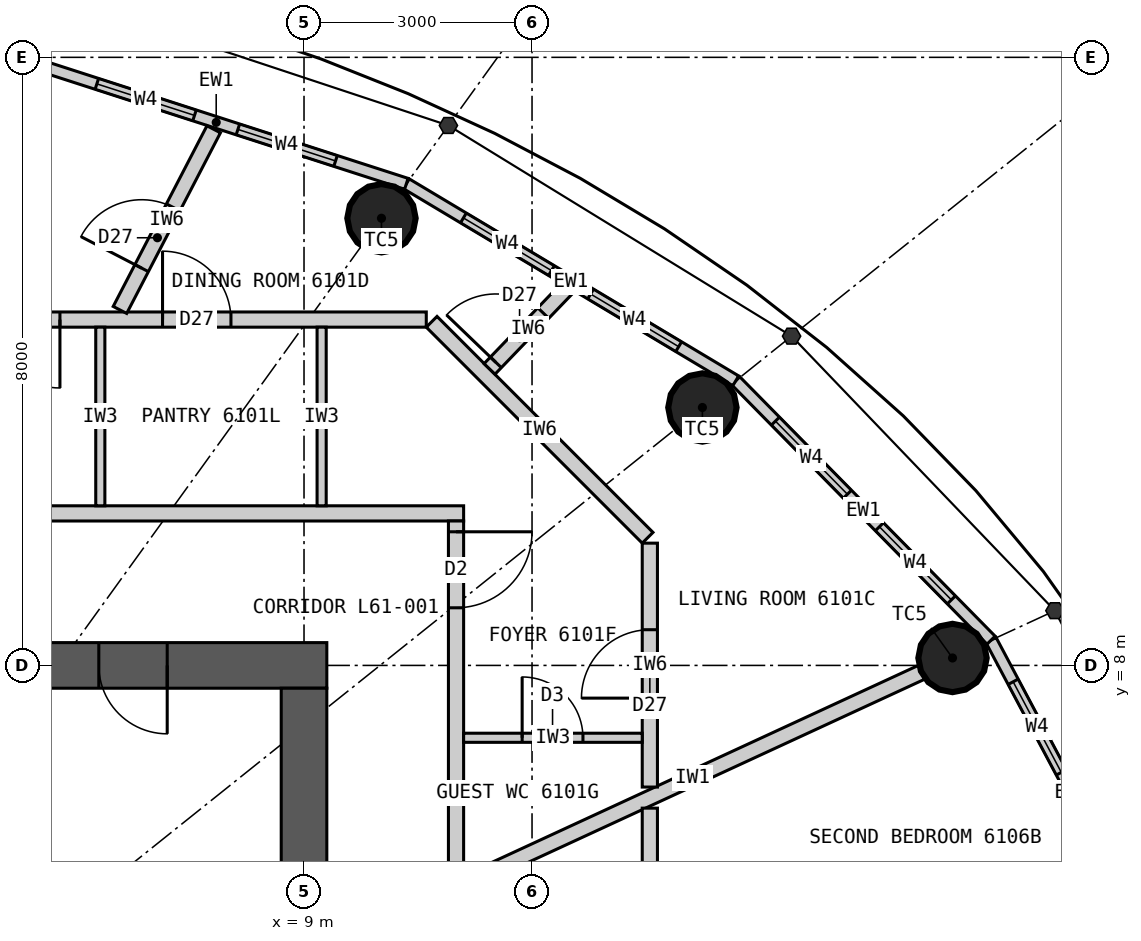
"""IFC4 building model, lengths in metres.
Left out: names, types, materials, properties, quantities, classifications, styles, units other than length and angle.
Written with IfcOpenShell. Run it as: python <this file> out.ifc"""

import sys

from ifc_helpers import new_model, si_unit, direction, frame, frame_2d, origin, origin_2d, place, context, subcontext, project, spatial, rectangle, circle, extrude, element, fill, save


model = new_model("IFC4")
c1 = context("Model", 3, precision=1e-05, world=origin(), true_north=direction((0.0, 1.0)))
c2 = subcontext(c1, "Body", "Model", "MODEL_VIEW")
j1 = project(units=[si_unit("LENGTHUNIT", "METRE"), si_unit("PLANEANGLEUNIT", "RADIAN")], contexts=[c1])
p1 = place(None, origin())
s1 = spatial("IfcSite", under=j1, at=p1, CompositionType="ELEMENT")
p2 = place(p1, origin())
s2 = spatial("IfcBuilding", under=s1, at=p2, CompositionType="ELEMENT")
p3 = place(p2, frame((0.0, 0.0, 225.9)))
s3 = spatial("IfcBuildingStorey", under=s2, at=p3, CompositionType="ELEMENT", Elevation=225.9)
for number, where, z_axis, x_axis in (
    (1, (17.532, 8.098, 0.0), (0.0, 0.0, 1.0), (1.0, 0.0, 0.0)),
    (2, (14.241, 11.393, 0.0), (0.0, 0.0, 1.0), (1.0, 0.0, 0.0)),
    (3, (10.019, 13.883, 0.0), (0.0, 0.0, 1.0), (1.0, 0.0, 0.0)),
):
    element("IfcColumn", number, at=place(p3, frame(where, z_axis=z_axis, x_axis=x_axis)), inside=s3, PredefinedType="COLUMN", context=c2, shape_type="SweptSolid", body=[
        extrude(circle(Radius=0.45, at=origin_2d()), origin(), (0.0, 0.0, 1.0), 3.3),
    ])
p4 = place(p3, frame((-9.3, 8.0, 0.0), z_axis=(0.0, 0.0, 1.0), x_axis=(1.0, 0.0, 0.0)))
e4 = element("IfcWall", 4, at=p4, inside=s3, PredefinedType="SHEAR", context=c2, shape_type="SweptSolid", body=[
    extrude(rectangle(XDim=18.6, YDim=0.6, at=frame_2d((9.3, 0.0))), origin(), (0.0, 0.0, 1.0), 3.3),
])
p5 = place(p4, frame((8.0, 0.0, 0.0)))
e5 = element("IfcOpeningElement", 5, at=p5, cuts=e4, PredefinedType="OPENING", context=c2, shape_type="SweptSolid", body=[
    extrude(rectangle(XDim=1.2, YDim=2.2, at=frame_2d((0.6, 1.1))), frame((0.0, 0.31, 0.0), z_axis=(0.0, -1.0, 0.0), x_axis=(1.0, 0.0, 0.0)), (0.0, 0.0, 1.0), 0.62),
])
p6 = place(p4, frame((15.6, 0.0, 0.0)))
e6 = element("IfcOpeningElement", 6, at=p6, cuts=e4, PredefinedType="OPENING", context=c2, shape_type="SweptSolid", body=[
    extrude(rectangle(XDim=0.9, YDim=2.2, at=frame_2d((0.45, 1.1))), frame((0.0, 0.31, 0.0), z_axis=(0.0, -1.0, 0.0), x_axis=(1.0, 0.0, 0.0)), (0.0, 0.0, 1.0), 0.62),
])
p7 = place(p3, frame((9.0, -7.7, 0.0), z_axis=(0.0, 0.0, 1.0), x_axis=(0.0, 1.0, 0.0)))
e7 = element("IfcWall", 7, at=p7, inside=s3, PredefinedType="SHEAR", context=c2, shape_type="SweptSolid", body=[
    extrude(rectangle(XDim=15.4, YDim=0.6, at=frame_2d((7.7, 0.0))), origin(), (0.0, 0.0, 1.0), 3.3),
])
p8 = place(p7, frame((6.8, 0.0, 0.0)))
e8 = element("IfcOpeningElement", 8, at=p8, cuts=e7, PredefinedType="OPENING", context=c2, shape_type="SweptSolid", body=[
    extrude(rectangle(XDim=1.8, YDim=2.2, at=frame_2d((0.9, 1.1))), frame((0.0, 0.31, 0.0), z_axis=(0.0, -1.0, 0.0), x_axis=(1.0, 0.0, 0.0)), (0.0, 0.0, 1.0), 0.62),
])
p9 = place(p3, frame((20.17, 4.323, 0.0), z_axis=(0.0, 0.0, 1.0), x_axis=(-0.469256152955, 0.883062094597, 0.0)))
e9 = element("IfcWall", 9, at=p9, inside=s3, PredefinedType="ELEMENTEDWALL", context=c2, shape_type="SweptSolid", body=[
    extrude(rectangle(XDim=4.539, YDim=0.15, at=frame_2d((2.27, 0.0))), origin(), (0.0, 0.0, 1.0), 3.12),
])
p10 = place(p9, frame((0.62, 0.0, 0.9)))
e10 = element("IfcOpeningElement", 10, at=p10, cuts=e9, PredefinedType="OPENING", context=c2, shape_type="SweptSolid", body=[
    extrude(rectangle(XDim=1.35, YDim=1.9, at=frame_2d((0.675, 0.95))), frame((0.0, 0.085, 0.0), z_axis=(0.0, -1.0, 0.0), x_axis=(1.0, 0.0, 0.0)), (0.0, 0.0, 1.0), 0.17),
])
p11 = place(p9, frame((2.57, 0.0, 0.9)))
e11 = element("IfcOpeningElement", 11, at=p11, cuts=e9, PredefinedType="OPENING", context=c2, shape_type="SweptSolid", body=[
    extrude(rectangle(XDim=1.35, YDim=1.9, at=frame_2d((0.675, 0.95))), frame((0.0, 0.085, 0.0), z_axis=(0.0, -1.0, 0.0), x_axis=(1.0, 0.0, 0.0)), (0.0, 0.0, 1.0), 0.17),
])
p12 = place(p3, frame((18.04, 8.332, 0.0), z_axis=(0.0, 0.0, 1.0), x_axis=(-0.701527379618, 0.712642501993, 0.0)))
e12 = element("IfcWall", 12, at=p12, inside=s3, PredefinedType="ELEMENTEDWALL", context=c2, shape_type="SweptSolid", body=[
    extrude(rectangle(XDim=4.788, YDim=0.15, at=frame_2d((2.394, 0.0))), origin(), (0.0, 0.0, 1.0), 3.12),
])
p13 = place(p12, frame((0.744, 0.0, 0.9)))
e13 = element("IfcOpeningElement", 13, at=p13, cuts=e12, PredefinedType="OPENING", context=c2, shape_type="SweptSolid", body=[
    extrude(rectangle(XDim=1.35, YDim=1.9, at=frame_2d((0.675, 0.95))), frame((0.0, 0.085, 0.0), z_axis=(0.0, -1.0, 0.0), x_axis=(1.0, 0.0, 0.0)), (0.0, 0.0, 1.0), 0.17),
])
p14 = place(p12, frame((2.694, 0.0, 0.9)))
e14 = element("IfcOpeningElement", 14, at=p14, cuts=e12, PredefinedType="OPENING", context=c2, shape_type="SweptSolid", body=[
    extrude(rectangle(XDim=1.35, YDim=1.9, at=frame_2d((0.675, 0.95))), frame((0.0, 0.085, 0.0), z_axis=(0.0, -1.0, 0.0), x_axis=(1.0, 0.0, 0.0)), (0.0, 0.0, 1.0), 0.17),
])
p15 = place(p3, frame((14.68, 11.744, 0.0), z_axis=(0.0, 0.0, 1.0), x_axis=(-0.85822150553, 0.513279502265, 0.0)))
e15 = element("IfcWall", 15, at=p15, inside=s3, PredefinedType="ELEMENTEDWALL", context=c2, shape_type="SweptSolid", body=[
    extrude(rectangle(XDim=5.05, YDim=0.15, at=frame_2d((2.525, 0.0))), origin(), (0.0, 0.0, 1.0), 3.12),
])
p16 = place(p15, frame((0.875, 0.0, 0.9)))
e16 = element("IfcOpeningElement", 16, at=p16, cuts=e15, PredefinedType="OPENING", context=c2, shape_type="SweptSolid", body=[
    extrude(rectangle(XDim=1.35, YDim=1.9, at=frame_2d((0.675, 0.95))), frame((0.0, 0.085, 0.0), z_axis=(0.0, -1.0, 0.0), x_axis=(1.0, 0.0, 0.0)), (0.0, 0.0, 1.0), 0.17),
])
p17 = place(p15, frame((2.825, 0.0, 0.9)))
e17 = element("IfcOpeningElement", 17, at=p17, cuts=e15, PredefinedType="OPENING", context=c2, shape_type="SweptSolid", body=[
    extrude(rectangle(XDim=1.35, YDim=1.9, at=frame_2d((0.675, 0.95))), frame((0.0, 0.085, 0.0), z_axis=(0.0, -1.0, 0.0), x_axis=(1.0, 0.0, 0.0)), (0.0, 0.0, 1.0), 0.17),
])
p18 = place(p3, frame((10.346, 14.336, 0.0), z_axis=(0.0, 0.0, 1.0), x_axis=(-0.951644702515, 0.307200846638, 0.0)))
e18 = element("IfcWall", 18, at=p18, inside=s3, PredefinedType="ELEMENTEDWALL", context=c2, shape_type="SweptSolid", body=[
    extrude(rectangle(XDim=5.258, YDim=0.15, at=frame_2d((2.629, 0.0))), origin(), (0.0, 0.0, 1.0), 3.12),
])
p19 = place(p18, frame((0.979, 0.0, 0.9)))
e19 = element("IfcOpeningElement", 19, at=p19, cuts=e18, PredefinedType="OPENING", context=c2, shape_type="SweptSolid", body=[
    extrude(rectangle(XDim=1.35, YDim=1.9, at=frame_2d((0.675, 0.95))), frame((0.0, 0.085, 0.0), z_axis=(0.0, -1.0, 0.0), x_axis=(1.0, 0.0, 0.0)), (0.0, 0.0, 1.0), 0.17),
])
p20 = place(p18, frame((2.929, 0.0, 0.9)))
e20 = element("IfcOpeningElement", 20, at=p20, cuts=e18, PredefinedType="OPENING", context=c2, shape_type="SweptSolid", body=[
    extrude(rectangle(XDim=1.35, YDim=1.9, at=frame_2d((0.675, 0.95))), frame((0.0, 0.085, 0.0), z_axis=(0.0, -1.0, 0.0), x_axis=(1.0, 0.0, 0.0)), (0.0, 0.0, 1.0), 0.17),
])
p21 = place(p3, frame((-11.1, 10.0, 0.0), z_axis=(0.0, 0.0, 1.0), x_axis=(1.0, 0.0, 0.0)))
e21 = element("IfcWall", 21, at=p21, inside=s3, PredefinedType="PARTITIONING", context=c2, shape_type="SweptSolid", body=[
    extrude(rectangle(XDim=22.2, YDim=0.2, at=frame_2d((11.1, 0.0))), origin(), (0.0, 0.0, 1.0), 3.12),
])
p22 = place(p21, frame((0.3, 0.0, 0.0)))
e22 = element("IfcOpeningElement", 22, at=p22, cuts=e21, PredefinedType="OPENING", context=c2, shape_type="SweptSolid", body=[
    extrude(rectangle(XDim=1.0, YDim=2.2, at=frame_2d((0.5, 1.1))), frame((0.0, 0.11, 0.0), z_axis=(0.0, -1.0, 0.0), x_axis=(1.0, 0.0, 0.0)), (0.0, 0.0, 1.0), 0.22),
])
p23 = place(p3, frame((11.0, -9.9, 0.0), z_axis=(0.0, 0.0, 1.0), x_axis=(0.0, 1.0, 0.0)))
e23 = element("IfcWall", 23, at=p23, inside=s3, PredefinedType="PARTITIONING", context=c2, shape_type="SweptSolid", body=[
    extrude(rectangle(XDim=19.8, YDim=0.2, at=frame_2d((9.9, 0.0))), origin(), (0.0, 0.0, 1.0), 3.12),
])
p24 = place(p23, frame((18.658, 0.0, 0.0)))
e24 = element("IfcOpeningElement", 24, at=p24, cuts=e23, PredefinedType="OPENING", context=c2, shape_type="SweptSolid", body=[
    extrude(rectangle(XDim=1.0, YDim=2.2, at=frame_2d((0.5, 1.1))), frame((0.0, 0.11, 0.0), z_axis=(0.0, -1.0, 0.0), x_axis=(1.0, 0.0, 0.0)), (0.0, 0.0, 1.0), 0.22),
])
p25 = place(p23, frame((9.385, 0.0, 0.0)))
e25 = element("IfcOpeningElement", 25, at=p25, cuts=e23, PredefinedType="OPENING", context=c2, shape_type="SweptSolid", body=[
    extrude(rectangle(XDim=1.0, YDim=2.2, at=frame_2d((0.5, 1.1))), frame((0.0, 0.11, 0.0), z_axis=(0.0, -1.0, 0.0), x_axis=(1.0, 0.0, 0.0)), (0.0, 0.0, 1.0), 0.22),
])
p26 = place(p3, frame((11.1, 5.127, 0.0), z_axis=(0.0, 0.0, 1.0), x_axis=(0.907840886552, 0.419314827672, 0.0)))
e26 = element("IfcWall", 26, at=p26, inside=s3, PredefinedType="PARTITIONING", context=c2, shape_type="SweptSolid", body=[
    extrude(rectangle(XDim=6.635, YDim=0.2, at=frame_2d((3.318, 0.0))), origin(), (0.0, 0.0, 1.0), 2.32),
])
p27 = place(p3, frame((13.55, 6.4, 0.0), z_axis=(0.0, 0.0, 1.0), x_axis=(0.0, 1.0, 0.0)))
e27 = element("IfcWall", 27, at=p27, inside=s3, PredefinedType="PARTITIONING", context=c2, shape_type="SweptSolid", body=[
    extrude(rectangle(XDim=3.209, YDim=0.2, at=frame_2d((1.604, 0.0))), origin(), (0.0, 0.0, 1.0), 3.12),
])
p28 = place(p27, frame((1.17, 0.0, 0.0)))
e28 = element("IfcOpeningElement", 28, at=p28, cuts=e27, PredefinedType="OPENING", context=c2, shape_type="SweptSolid", body=[
    extrude(rectangle(XDim=0.9, YDim=2.1, at=frame_2d((0.45, 1.05))), frame((0.0, 0.11, 0.0), z_axis=(0.0, -1.0, 0.0), x_axis=(1.0, 0.0, 0.0)), (0.0, 0.0, 1.0), 0.22),
])
p29 = place(p3, frame((13.521, 9.679, 0.0), z_axis=(0.0, 0.0, 1.0), x_axis=(-0.707106781187, 0.707106781187, 0.0)))
e29 = element("IfcWall", 29, at=p29, inside=s3, PredefinedType="PARTITIONING", context=c2, shape_type="SweptSolid", body=[
    extrude(rectangle(XDim=4.019, YDim=0.2, at=frame_2d((2.009, 0.0))), origin(), (0.0, 0.0, 1.0), 3.12),
])
p30 = place(p3, frame((10.609, 12.55, 0.0), z_axis=(0.0, 0.0, 1.0), x_axis=(-1.0, 0.0, 0.0)))
e30 = element("IfcWall", 30, at=p30, inside=s3, PredefinedType="PARTITIONING", context=c2, shape_type="SweptSolid", body=[
    extrude(rectangle(XDim=10.508, YDim=0.2, at=frame_2d((5.254, 0.0))), origin(), (0.0, 0.0, 1.0), 3.12),
])
p31 = place(p30, frame((2.57, 0.0, 0.0)))
e31 = element("IfcOpeningElement", 31, at=p31, cuts=e30, PredefinedType="OPENING", context=c2, shape_type="SweptSolid", body=[
    extrude(rectangle(XDim=0.9, YDim=2.1, at=frame_2d((0.45, 1.05))), frame((0.0, 0.11, 0.0), z_axis=(0.0, -1.0, 0.0), x_axis=(1.0, 0.0, 0.0)), (0.0, 0.0, 1.0), 0.22),
])
p32 = place(p30, frame((4.82, 0.0, 0.0)))
e32 = element("IfcOpeningElement", 32, at=p32, cuts=e30, PredefinedType="OPENING", context=c2, shape_type="SweptSolid", body=[
    extrude(rectangle(XDim=0.9, YDim=2.1, at=frame_2d((0.45, 1.05))), frame((0.0, 0.11, 0.0), z_axis=(0.0, -1.0, 0.0), x_axis=(1.0, 0.0, 0.0)), (0.0, 0.0, 1.0), 0.22),
])
p33 = place(p30, frame((7.303, 0.0, 0.0)))
e33 = element("IfcOpeningElement", 33, at=p33, cuts=e30, PredefinedType="OPENING", context=c2, shape_type="SweptSolid", body=[
    extrude(rectangle(XDim=0.8, YDim=2.1, at=frame_2d((0.4, 1.05))), frame((0.0, 0.11, 0.0), z_axis=(0.0, -1.0, 0.0), x_axis=(1.0, 0.0, 0.0)), (0.0, 0.0, 1.0), 0.22),
])
p34 = place(p3, frame((11.441, 11.9, 0.0), z_axis=(0.0, 0.0, 1.0), x_axis=(0.692958717259, 0.720977264672, 0.0)))
e34 = element("IfcWall", 34, at=p34, inside=s3, PredefinedType="PARTITIONING", context=c2, shape_type="SweptSolid", body=[
    extrude(rectangle(XDim=1.464, YDim=0.2, at=frame_2d((0.732, 0.0))), origin(), (0.0, 0.0, 1.0), 3.12),
])
p35 = place(p34, frame((0.12, 0.0, 0.0)))
e35 = element("IfcOpeningElement", 35, at=p35, cuts=e34, PredefinedType="OPENING", context=c2, shape_type="SweptSolid", body=[
    extrude(rectangle(XDim=0.9, YDim=2.1, at=frame_2d((0.45, 1.05))), frame((0.0, 0.11, 0.0), z_axis=(0.0, -1.0, 0.0), x_axis=(1.0, 0.0, 0.0)), (0.0, 0.0, 1.0), 0.22),
])
p36 = place(p3, frame((6.578, 12.677, 0.0), z_axis=(0.0, 0.0, 1.0), x_axis=(0.460620531465, 0.887597164255, 0.0)))
e36 = element("IfcWall", 36, at=p36, inside=s3, PredefinedType="PARTITIONING", context=c2, shape_type="SweptSolid", body=[
    extrude(rectangle(XDim=2.678, YDim=0.2, at=frame_2d((1.339, 0.0))), origin(), (0.0, 0.0, 1.0), 3.12),
])
p37 = place(p36, frame((0.62, 0.0, 0.0)))
e37 = element("IfcOpeningElement", 37, at=p37, cuts=e36, PredefinedType="OPENING", context=c2, shape_type="SweptSolid", body=[
    extrude(rectangle(XDim=0.9, YDim=2.1, at=frame_2d((0.45, 1.05))), frame((0.0, 0.11, 0.0), z_axis=(0.0, -1.0, 0.0), x_axis=(1.0, 0.0, 0.0)), (0.0, 0.0, 1.0), 0.22),
])
p38 = place(p3, frame((11.1, 7.048, 0.0), z_axis=(0.0, 0.0, 1.0), x_axis=(1.0, 0.0, 0.0)))
e38 = element("IfcWall", 38, at=p38, inside=s3, PredefinedType="PARTITIONING", context=c2, shape_type="SweptSolid", body=[
    extrude(rectangle(XDim=2.35, YDim=0.12, at=frame_2d((1.175, 0.0))), origin(), (0.0, 0.0, 1.0), 3.12),
])
p39 = place(p38, frame((0.77, 0.0, 0.0)))
e39 = element("IfcOpeningElement", 39, at=p39, cuts=e38, PredefinedType="OPENING", context=c2, shape_type="SweptSolid", body=[
    extrude(rectangle(XDim=0.8, YDim=2.1, at=frame_2d((0.4, 1.05))), frame((0.0, 0.07, 0.0), z_axis=(0.0, -1.0, 0.0), x_axis=(1.0, 0.0, 0.0)), (0.0, 0.0, 1.0), 0.14),
])
for number, where, z_axis, x_axis in (
    (40, (9.232, 10.1, 0.0), (0.0, 0.0, 1.0), (0.0, 1.0, 0.0)),
    (41, (6.32, 10.1, 0.0), (0.0, 0.0, 1.0), (0.0, 1.0, 0.0)),
):
    element("IfcWall", number, at=place(p3, frame(where, z_axis=z_axis, x_axis=x_axis)), inside=s3, PredefinedType="PARTITIONING", context=c2, shape_type="SweptSolid", body=[
        extrude(rectangle(XDim=2.35, YDim=0.12, at=frame_2d((1.175, 0.0))), origin(), (0.0, 0.0, 1.0), 3.12),
    ])
p40 = place(p3, frame((13.55, -6.122, 0.0), z_axis=(0.0, 0.0, 1.0), x_axis=(0.0, 1.0, 0.0)))
e42 = element("IfcWall", 42, at=p40, inside=s3, PredefinedType="PARTITIONING", context=c2, shape_type="SweptSolid", body=[
    extrude(rectangle(XDim=12.245, YDim=0.2, at=frame_2d((6.122, 0.0))), origin(), (0.0, 0.0, 1.0), 3.12),
])
p41 = place(p40, frame((2.07, 0.0, 0.0)))
e43 = element("IfcOpeningElement", 43, at=p41, cuts=e42, PredefinedType="OPENING", context=c2, shape_type="SweptSolid", body=[
    extrude(rectangle(XDim=0.8, YDim=2.1, at=frame_2d((0.4, 1.05))), frame((0.0, 0.11, 0.0), z_axis=(0.0, -1.0, 0.0), x_axis=(1.0, 0.0, 0.0)), (0.0, 0.0, 1.0), 0.22),
])
p42 = place(p40, frame((9.37, 0.0, 0.0)))
e44 = element("IfcOpeningElement", 44, at=p42, cuts=e42, PredefinedType="OPENING", context=c2, shape_type="SweptSolid", body=[
    extrude(rectangle(XDim=0.8, YDim=2.1, at=frame_2d((0.4, 1.05))), frame((0.0, 0.11, 0.0), z_axis=(0.0, -1.0, 0.0), x_axis=(1.0, 0.0, 0.0)), (0.0, 0.0, 1.0), 0.22),
])
p43 = place(p40, frame((5.67, 0.0, 0.0)))
e45 = element("IfcOpeningElement", 45, at=p43, cuts=e42, PredefinedType="OPENING", context=c2, shape_type="SweptSolid", body=[
    extrude(rectangle(XDim=0.9, YDim=2.1, at=frame_2d((0.45, 1.05))), frame((0.0, 0.11, 0.0), z_axis=(0.0, -1.0, 0.0), x_axis=(1.0, 0.0, 0.0)), (0.0, 0.0, 1.0), 0.22),
])
p44 = place(p11, origin())
e46 = element("IfcWindow", 46, at=p44, inside=s3, PartitioningType="SINGLE_PANEL", PredefinedType="WINDOW", context=c2, shape_type="SweptSolid", body=[
    extrude(rectangle(XDim=1.35, YDim=1.9, at=frame_2d((0.675, 0.95))), frame((0.0, 0.03, 0.0), z_axis=(0.0, -1.0, 0.0), x_axis=(1.0, 0.0, 0.0)), (0.0, 0.0, 1.0), 0.06),
])
fill(e11, e46)
p45 = place(p13, origin())
e47 = element("IfcWindow", 47, at=p45, inside=s3, PartitioningType="SINGLE_PANEL", PredefinedType="WINDOW", context=c2, shape_type="SweptSolid", body=[
    extrude(rectangle(XDim=1.35, YDim=1.9, at=frame_2d((0.675, 0.95))), frame((0.0, 0.03, 0.0), z_axis=(0.0, -1.0, 0.0), x_axis=(1.0, 0.0, 0.0)), (0.0, 0.0, 1.0), 0.06),
])
fill(e13, e47)
p46 = place(p14, origin())
e48 = element("IfcWindow", 48, at=p46, inside=s3, PartitioningType="SINGLE_PANEL", PredefinedType="WINDOW", context=c2, shape_type="SweptSolid", body=[
    extrude(rectangle(XDim=1.35, YDim=1.9, at=frame_2d((0.675, 0.95))), frame((0.0, 0.03, 0.0), z_axis=(0.0, -1.0, 0.0), x_axis=(1.0, 0.0, 0.0)), (0.0, 0.0, 1.0), 0.06),
])
fill(e14, e48)
p47 = place(p16, origin())
e49 = element("IfcWindow", 49, at=p47, inside=s3, PartitioningType="SINGLE_PANEL", PredefinedType="WINDOW", context=c2, shape_type="SweptSolid", body=[
    extrude(rectangle(XDim=1.35, YDim=1.9, at=frame_2d((0.675, 0.95))), frame((0.0, 0.03, 0.0), z_axis=(0.0, -1.0, 0.0), x_axis=(1.0, 0.0, 0.0)), (0.0, 0.0, 1.0), 0.06),
])
fill(e16, e49)
p48 = place(p17, origin())
e50 = element("IfcWindow", 50, at=p48, inside=s3, PartitioningType="SINGLE_PANEL", PredefinedType="WINDOW", context=c2, shape_type="SweptSolid", body=[
    extrude(rectangle(XDim=1.35, YDim=1.9, at=frame_2d((0.675, 0.95))), frame((0.0, 0.03, 0.0), z_axis=(0.0, -1.0, 0.0), x_axis=(1.0, 0.0, 0.0)), (0.0, 0.0, 1.0), 0.06),
])
fill(e17, e50)
p49 = place(p19, origin())
e51 = element("IfcWindow", 51, at=p49, inside=s3, PartitioningType="SINGLE_PANEL", PredefinedType="WINDOW", context=c2, shape_type="SweptSolid", body=[
    extrude(rectangle(XDim=1.35, YDim=1.9, at=frame_2d((0.675, 0.95))), frame((0.0, 0.03, 0.0), z_axis=(0.0, -1.0, 0.0), x_axis=(1.0, 0.0, 0.0)), (0.0, 0.0, 1.0), 0.06),
])
fill(e19, e51)
p50 = place(p20, origin())
e52 = element("IfcWindow", 52, at=p50, inside=s3, PartitioningType="SINGLE_PANEL", PredefinedType="WINDOW", context=c2, shape_type="SweptSolid", body=[
    extrude(rectangle(XDim=1.35, YDim=1.9, at=frame_2d((0.675, 0.95))), frame((0.0, 0.03, 0.0), z_axis=(0.0, -1.0, 0.0), x_axis=(1.0, 0.0, 0.0)), (0.0, 0.0, 1.0), 0.06),
])
fill(e20, e52)
p51 = place(p24, origin())
e53 = element("IfcDoor", 53, at=p51, inside=s3, OperationType="SINGLE_SWING_RIGHT", PredefinedType="DOOR", context=c2, shape_type="SweptSolid", body=[
    extrude(rectangle(XDim=1.0, YDim=2.2, at=frame_2d((0.5, 1.1))), frame((0.0, 0.025, 0.0), z_axis=(0.0, -1.0, 0.0), x_axis=(1.0, 0.0, 0.0)), (0.0, 0.0, 1.0), 0.05),
])
fill(e24, e53)
p52 = place(p39, origin())
e54 = element("IfcDoor", 54, at=p52, inside=s3, OperationType="SINGLE_SWING_LEFT", PredefinedType="DOOR", context=c2, shape_type="SweptSolid", body=[
    extrude(rectangle(XDim=0.8, YDim=2.1, at=frame_2d((0.4, 1.05))), frame((0.0, 0.025, 0.0), z_axis=(0.0, -1.0, 0.0), x_axis=(1.0, 0.0, 0.0)), (0.0, 0.0, 1.0), 0.05),
])
fill(e39, e54)
p53 = place(p31, origin())
e55 = element("IfcDoor", 55, at=p53, inside=s3, OperationType="SINGLE_SWING_RIGHT", PredefinedType="DOOR", context=c2, shape_type="SweptSolid", body=[
    extrude(rectangle(XDim=0.9, YDim=2.1, at=frame_2d((0.45, 1.05))), frame((0.0, 0.025, 0.0), z_axis=(0.0, -1.0, 0.0), x_axis=(1.0, 0.0, 0.0)), (0.0, 0.0, 1.0), 0.05),
])
fill(e31, e55)
p54 = place(p32, origin())
e56 = element("IfcDoor", 56, at=p54, inside=s3, OperationType="SINGLE_SWING_LEFT", PredefinedType="DOOR", context=c2, shape_type="SweptSolid", body=[
    extrude(rectangle(XDim=0.9, YDim=2.1, at=frame_2d((0.45, 1.05))), frame((0.0, 0.025, 0.0), z_axis=(0.0, -1.0, 0.0), x_axis=(1.0, 0.0, 0.0)), (0.0, 0.0, 1.0), 0.05),
])
fill(e32, e56)
p55 = place(p28, origin())
e57 = element("IfcDoor", 57, at=p55, inside=s3, OperationType="SINGLE_SWING_LEFT", PredefinedType="DOOR", context=c2, shape_type="SweptSolid", body=[
    extrude(rectangle(XDim=0.9, YDim=2.1, at=frame_2d((0.45, 1.05))), frame((0.0, 0.025, 0.0), z_axis=(0.0, -1.0, 0.0), x_axis=(1.0, 0.0, 0.0)), (0.0, 0.0, 1.0), 0.05),
])
fill(e28, e57)
p56 = place(p35, origin())
e58 = element("IfcDoor", 58, at=p56, inside=s3, OperationType="SINGLE_SWING_LEFT", PredefinedType="DOOR", context=c2, shape_type="SweptSolid", body=[
    extrude(rectangle(XDim=0.9, YDim=2.1, at=frame_2d((0.45, 1.05))), frame((0.0, 0.025, 0.0), z_axis=(0.0, -1.0, 0.0), x_axis=(1.0, 0.0, 0.0)), (0.0, 0.0, 1.0), 0.05),
])
fill(e35, e58)
p57 = place(p37, origin())
e59 = element("IfcDoor", 59, at=p57, inside=s3, OperationType="SINGLE_SWING_LEFT", PredefinedType="DOOR", context=c2, shape_type="SweptSolid", body=[
    extrude(rectangle(XDim=0.9, YDim=2.1, at=frame_2d((0.45, 1.05))), frame((0.0, 0.025, 0.0), z_axis=(0.0, -1.0, 0.0), x_axis=(1.0, 0.0, 0.0)), (0.0, 0.0, 1.0), 0.05),
])
fill(e37, e59)
p58 = place(p6, origin())
e60 = element("IfcDoor", 60, at=p58, inside=s3, OperationType="SINGLE_SWING_RIGHT", PredefinedType="DOOR", context=c2, shape_type="SweptSolid", body=[
    extrude(rectangle(XDim=0.9, YDim=2.2, at=frame_2d((0.45, 1.1))), frame((0.0, 0.025, 0.0), z_axis=(0.0, -1.0, 0.0), x_axis=(1.0, 0.0, 0.0)), (0.0, 0.0, 1.0), 0.05),
])
fill(e6, e60)
save(model, sys.argv[1])
